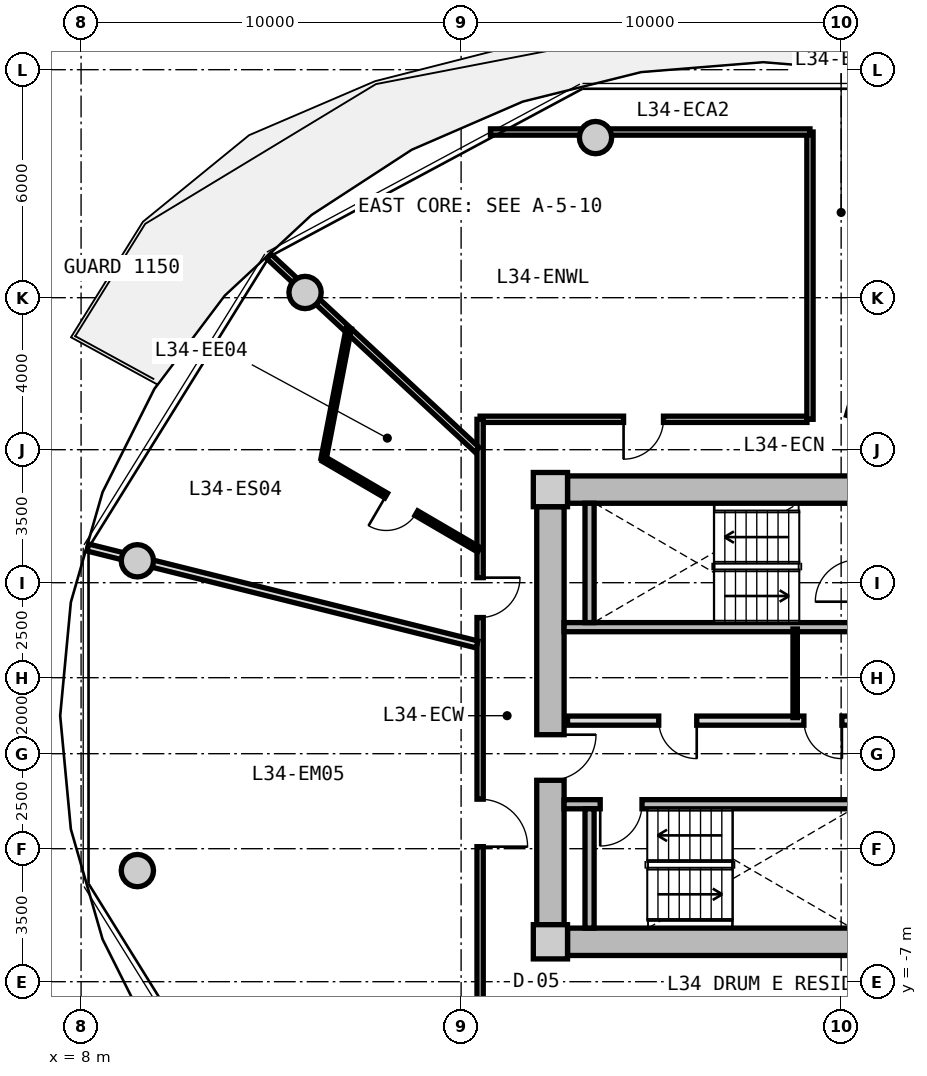
"""IFC4 building model, lengths in metres.
Left out: names, types, materials, properties, quantities, classifications, styles, units other than length and angle.
Written with IfcOpenShell. Run it as: python <this file> out.ifc"""

import sys

from ifc_helpers import new_model, si_unit, direction, frame, frame_2d, origin, origin_2d, place, context, subcontext, project, spatial, rectangle, circle, extrude, source, transform, mapped, element, fill, save


model = new_model("IFC4")
c1 = context("Model", 3, precision=1e-05, world=origin(), true_north=direction((0.0, 1.0)))
c2 = subcontext(c1, "Body", "Model", "MODEL_VIEW")
j1 = project(units=[si_unit("LENGTHUNIT", "METRE"), si_unit("PLANEANGLEUNIT", "RADIAN")], contexts=[c1])
p1 = place(None, origin())
s1 = spatial("IfcSite", under=j1, at=p1, CompositionType="ELEMENT")
p2 = place(p1, origin())
s2 = spatial("IfcBuilding", under=s1, at=p2, CompositionType="ELEMENT")
p3 = place(p2, frame((0.0, 0.0, 111.5)))
s3 = spatial("IfcBuildingStorey", under=s2, at=p3, CompositionType="ELEMENT", Elevation=111.5)
m1 = source(origin(), c2, "Body", "SweptSolid", [
    extrude(rectangle(XDim=0.9, YDim=0.9, at=origin_2d()), origin(), (0.0, 0.0, 1.0), 3.05),
])
for number, where, z_axis, x_axis in (
    (1, (20.35, -5.95, 0.0), (0.0, 0.0, 1.0), (1.0, 0.0, 0.0)),
    (2, (20.35, 5.95, 0.0), (0.0, 0.0, 1.0), (1.0, 0.0, 0.0)),
):
    element("IfcColumn", number, at=place(p3, frame(where, z_axis=z_axis, x_axis=x_axis)), inside=s3, PredefinedType="COLUMN", context=c2, shape_type="MappedRepresentation", body=[
        mapped(m1, transform((0.0, 0.0, 0.0), x_axis=(1.0, 0.0, 0.0), y_axis=(0.0, 1.0, 0.0), z_axis=(0.0, 0.0, 1.0), scale=1.0)),
    ])
m2 = source(origin(), c2, "Body", "SweptSolid", [
    extrude(rectangle(XDim=14.4, YDim=0.72, at=frame_2d((7.2, 0.0))), origin(), (0.0, 0.0, 1.0), 2.79),
])
for number, where, z_axis, x_axis in (
    (3, (20.8, 5.95, 0.0), (0.0, 0.0, 1.0), (1.0, 0.0, 0.0)),
    (4, (35.2, -5.95, 0.0), (0.0, 0.0, 1.0), (-1.0, 0.0, 0.0)),
):
    element("IfcWall", number, at=place(p3, frame(where, z_axis=z_axis, x_axis=x_axis)), inside=s3, PredefinedType="SHEAR", context=c2, shape_type="MappedRepresentation", body=[
        mapped(m2, transform((0.0, 0.0, 0.0), x_axis=(1.0, 0.0, 0.0), y_axis=(0.0, 1.0, 0.0), z_axis=(0.0, 0.0, 1.0), scale=1.0)),
    ])
m3 = source(origin(), c2, "Body", "SweptSolid", [
    extrude(rectangle(XDim=11.0, YDim=0.72, at=frame_2d((5.5, 0.0))), origin(), (0.0, 0.0, 1.0), 2.79),
])
p4 = place(p3, frame((20.35, -5.5, 0.0), z_axis=(0.0, 0.0, 1.0), x_axis=(0.0, 1.0, 0.0)))
e5 = element("IfcWall", 5, at=p4, inside=s3, PredefinedType="SHEAR", context=c2, shape_type="MappedRepresentation", body=[
    mapped(m3, transform((0.0, 0.0, 0.0), x_axis=(1.0, 0.0, 0.0), y_axis=(0.0, 1.0, 0.0), z_axis=(0.0, 0.0, 1.0), scale=1.0)),
])
p5 = place(p4, frame((3.8, 0.0, 0.0)))
e6 = element("IfcOpeningElement", 6, at=p5, cuts=e5, PredefinedType="OPENING", context=c2, shape_type="SweptSolid", body=[
    extrude(rectangle(XDim=1.2, YDim=2.15, at=frame_2d((0.6, 1.075))), frame((0.0, 0.37, 0.0), z_axis=(0.0, -1.0, 0.0), x_axis=(1.0, 0.0, 0.0)), (0.0, 0.0, 1.0), 0.74),
])
m4 = source(origin(), c2, "Body", "SweptSolid", [
    extrude(circle(Radius=0.425, at=origin_2d()), origin(), (0.0, 0.0, 1.0), 3.05),
])
for number, where, z_axis, x_axis in (
    (7, (21.537, 15.213, 0.0), (0.0, 0.0, 1.0), (1.0, 0.0, 0.0)),
    (8, (13.894, 11.137, 0.0), (0.0, 0.0, 1.0), (1.0, 0.0, 0.0)),
    (9, (9.481, 4.076, 0.0), (0.0, 0.0, 1.0), (1.0, 0.0, 0.0)),
    (10, (9.481, -4.076, 0.0), (0.0, 0.0, 1.0), (1.0, 0.0, 0.0)),
):
    element("IfcColumn", number, at=place(p3, frame(where, z_axis=z_axis, x_axis=x_axis)), inside=s3, PredefinedType="COLUMN", context=c2, shape_type="MappedRepresentation", body=[
        mapped(m4, transform((0.0, 0.0, 0.0), x_axis=(1.0, 0.0, 0.0), y_axis=(0.0, 1.0, 0.0), z_axis=(0.0, 0.0, 1.0), scale=1.0)),
    ])
m5 = source(origin(), c2, "Body", "SweptSolid", [
    extrude(rectangle(XDim=7.83, YDim=0.24, at=frame_2d((3.915, 0.0))), origin(), (0.0, 0.0, 1.0), 2.79),
])
p6 = place(p3, frame((20.71, 2.33, 0.0), z_axis=(0.0, 0.0, 1.0), x_axis=(1.0, 0.0, 0.0)))
e11 = element("IfcWall", 11, at=p6, inside=s3, PredefinedType="PARTITIONING", context=c2, shape_type="MappedRepresentation", body=[
    mapped(m5, transform((0.0, 0.0, 0.0), x_axis=(1.0, 0.0, 0.0), y_axis=(0.0, 1.0, 0.0), z_axis=(0.0, 0.0, 1.0), scale=1.0)),
])
m6 = source(origin(), c2, "Body", "SweptSolid", [
    extrude(rectangle(XDim=3.14, YDim=0.24, at=frame_2d((1.57, 0.0))), origin(), (0.0, 0.0, 1.0), 2.79),
])
p7 = place(p3, frame((21.38, 2.45, 0.0), z_axis=(0.0, 0.0, 1.0), x_axis=(0.0, 1.0, 0.0)))
e12 = element("IfcWall", 12, at=p7, inside=s3, PredefinedType="PARTITIONING", context=c2, shape_type="MappedRepresentation", body=[
    mapped(m6, transform((0.0, 0.0, 0.0), x_axis=(1.0, 0.0, 0.0), y_axis=(0.0, 1.0, 0.0), z_axis=(0.0, 0.0, 1.0), scale=1.0)),
])
p8 = place(p3, frame((20.71, -2.33, 0.0), z_axis=(0.0, 0.0, 1.0), x_axis=(1.0, 0.0, 0.0)))
e13 = element("IfcWall", 13, at=p8, inside=s3, PredefinedType="PARTITIONING", context=c2, shape_type="MappedRepresentation", body=[
    mapped(m5, transform((0.0, 0.0, 0.0), x_axis=(1.0, 0.0, 0.0), y_axis=(0.0, 1.0, 0.0), z_axis=(0.0, 0.0, 1.0), scale=1.0)),
])
p9 = place(p8, frame((0.95, 0.0, 0.0)))
e14 = element("IfcOpeningElement", 14, at=p9, cuts=e13, PredefinedType="OPENING", context=c2, shape_type="SweptSolid", body=[
    extrude(rectangle(XDim=1.1, YDim=2.15, at=frame_2d((0.55, 1.075))), frame((0.0, 0.13, 0.0), z_axis=(0.0, -1.0, 0.0), x_axis=(1.0, 0.0, 0.0)), (0.0, 0.0, 1.0), 0.26),
])
p10 = place(p3, frame((21.38, -5.59, 0.0), z_axis=(0.0, 0.0, 1.0), x_axis=(0.0, 1.0, 0.0)))
e15 = element("IfcWall", 15, at=p10, inside=s3, PredefinedType="PARTITIONING", context=c2, shape_type="MappedRepresentation", body=[
    mapped(m6, transform((0.0, 0.0, 0.0), x_axis=(1.0, 0.0, 0.0), y_axis=(0.0, 1.0, 0.0), z_axis=(0.0, 0.0, 1.0), scale=1.0)),
])
m7 = source(origin(), c2, "Body", "SweptSolid", [
    extrude(rectangle(XDim=7.62, YDim=0.24, at=frame_2d((3.81, 0.0))), origin(), (0.0, 0.0, 1.0), 2.775),
])
p11 = place(p3, frame((20.8, -0.13, 0.0), z_axis=(0.0, 0.0, 1.0), x_axis=(1.0, 0.0, 0.0)))
e16 = element("IfcWall", 16, at=p11, inside=s3, PredefinedType="PARTITIONING", context=c2, shape_type="MappedRepresentation", body=[
    mapped(m7, transform((0.0, 0.0, 0.0), x_axis=(1.0, 0.0, 0.0), y_axis=(0.0, 1.0, 0.0), z_axis=(0.0, 0.0, 1.0), scale=1.0)),
])
p12 = place(p11, frame((6.22, 0.0, 0.0)))
e17 = element("IfcOpeningElement", 17, at=p12, cuts=e16, PredefinedType="OPENING", context=c2, shape_type="SweptSolid", body=[
    extrude(rectangle(XDim=1.0, YDim=2.1, at=frame_2d((0.5, 1.05))), frame((0.0, 0.13, 0.0), z_axis=(0.0, -1.0, 0.0), x_axis=(1.0, 0.0, 0.0)), (0.0, 0.0, 1.0), 0.26),
])
p13 = place(p11, frame((2.4, 0.0, 0.0)))
e18 = element("IfcOpeningElement", 18, at=p13, cuts=e16, PredefinedType="OPENING", context=c2, shape_type="SweptSolid", body=[
    extrude(rectangle(XDim=1.0, YDim=2.1, at=frame_2d((0.5, 1.05))), frame((0.0, 0.13, 0.0), z_axis=(0.0, -1.0, 0.0), x_axis=(1.0, 0.0, 0.0)), (0.0, 0.0, 1.0), 0.26),
])
m8 = source(origin(), c2, "Body", "SweptSolid", [
    extrude(rectangle(XDim=2.33, YDim=0.115, at=frame_2d((1.165, 0.0))), origin(), (0.0, 0.0, 1.0), 2.775),
])
p14 = place(p3, frame((26.79, -0.05, 0.0), z_axis=(0.0, 0.0, 1.0), x_axis=(0.0, 1.0, 0.0)))
e19 = element("IfcWall", 19, at=p14, inside=s3, PredefinedType="PARTITIONING", context=c2, shape_type="MappedRepresentation", body=[
    mapped(m8, transform((0.0, 0.0, 0.0), x_axis=(1.0, 0.0, 0.0), y_axis=(0.0, 1.0, 0.0), z_axis=(0.0, 0.0, 1.0), scale=1.0)),
])
m9 = source(origin(), c2, "Body", "SweptSolid", [
    extrude(rectangle(XDim=8.6, YDim=0.165, at=frame_2d((4.3, 0.0))), origin(), (0.0, 0.0, 1.0), 2.775),
])
p15 = place(p3, frame((18.5, 7.8, 0.0), z_axis=(0.0, 0.0, 1.0), x_axis=(1.0, 0.0, 0.0)))
e20 = element("IfcWall", 20, at=p15, inside=s3, PredefinedType="PARTITIONING", context=c2, shape_type="MappedRepresentation", body=[
    mapped(m9, transform((0.0, 0.0, 0.0), x_axis=(1.0, 0.0, 0.0), y_axis=(0.0, 1.0, 0.0), z_axis=(0.0, 0.0, 1.0), scale=1.0)),
])
p16 = place(p15, frame((3.775, 0.0, 0.0)))
e21 = element("IfcOpeningElement", 21, at=p16, cuts=e20, PredefinedType="OPENING", context=c2, shape_type="SweptSolid", body=[
    extrude(rectangle(XDim=1.05, YDim=2.15, at=frame_2d((0.525, 1.075))), frame((0.0, 0.093, 0.0), z_axis=(0.0, -1.0, 0.0), x_axis=(1.0, 0.0, 0.0)), (0.0, 0.0, 1.0), 0.185),
])
m10 = source(origin(), c2, "Body", "SweptSolid", [
    extrude(rectangle(XDim=15.6, YDim=0.165, at=frame_2d((7.8, 0.0))), origin(), (0.0, 0.0, 1.0), 2.775),
])
p17 = place(p3, frame((18.5, -7.8, 0.0), z_axis=(0.0, 0.0, 1.0), x_axis=(0.0, 1.0, 0.0)))
e22 = element("IfcWall", 22, at=p17, inside=s3, PredefinedType="PARTITIONING", context=c2, shape_type="MappedRepresentation", body=[
    mapped(m10, transform((0.0, 0.0, 0.0), x_axis=(1.0, 0.0, 0.0), y_axis=(0.0, 1.0, 0.0), z_axis=(0.0, 0.0, 1.0), scale=1.0)),
])
p18 = place(p17, frame((10.383, 0.0, 0.0)))
e23 = element("IfcOpeningElement", 23, at=p18, cuts=e22, PredefinedType="OPENING", context=c2, shape_type="SweptSolid", body=[
    extrude(rectangle(XDim=1.05, YDim=2.15, at=frame_2d((0.525, 1.075))), frame((0.0, 0.093, 0.0), z_axis=(0.0, -1.0, 0.0), x_axis=(1.0, 0.0, 0.0)), (0.0, 0.0, 1.0), 0.185),
])
p19 = place(p17, frame((4.353, 0.0, 0.0)))
e24 = element("IfcOpeningElement", 24, at=p19, cuts=e22, PredefinedType="OPENING", context=c2, shape_type="SweptSolid", body=[
    extrude(rectangle(XDim=1.25, YDim=2.2, at=frame_2d((0.625, 1.1))), frame((0.0, 0.093, 0.0), z_axis=(0.0, -1.0, 0.0), x_axis=(1.0, 0.0, 0.0)), (0.0, 0.0, 1.0), 0.185),
])
m11 = source(origin(), c2, "Body", "SweptSolid", [
    extrude(rectangle(XDim=8.989, YDim=0.165, at=frame_2d((4.495, 0.0))), origin(), (0.0, 0.0, 1.0), 2.275),
])
p20 = place(p3, frame((28.222, 7.88, 0.0), z_axis=(0.0, 0.0, 1.0), x_axis=(0.27702323008, 0.960863221274, 0.0)))
e25 = element("IfcWall", 25, at=p20, inside=s3, PredefinedType="PARTITIONING", context=c2, shape_type="MappedRepresentation", body=[
    mapped(m11, transform((0.0, 0.0, 0.0), x_axis=(1.0, 0.0, 0.0), y_axis=(0.0, 1.0, 0.0), z_axis=(0.0, 0.0, 1.0), scale=1.0)),
])
m12 = source(origin(), c2, "Body", "SweptSolid", [
    extrude(rectangle(XDim=7.482, YDim=0.165, at=frame_2d((3.741, 0.0))), origin(), (0.0, 0.0, 1.0), 2.275),
])
p21 = place(p3, frame((18.42, 6.998, 0.0), z_axis=(0.0, 0.0, 1.0), x_axis=(-0.732508698043, 0.680757671489, 0.0)))
e26 = element("IfcWall", 26, at=p21, inside=s3, PredefinedType="PARTITIONING", context=c2, shape_type="MappedRepresentation", body=[
    mapped(m12, transform((0.0, 0.0, 0.0), x_axis=(1.0, 0.0, 0.0), y_axis=(0.0, 1.0, 0.0), z_axis=(0.0, 0.0, 1.0), scale=1.0)),
])
m13 = source(origin(), c2, "Body", "SweptSolid", [
    extrude(rectangle(XDim=7.56, YDim=0.165, at=frame_2d((3.78, 0.0))), origin(), (0.0, 0.0, 1.0), 2.775),
])
p22 = place(p3, frame((27.18, 7.8, 0.0), z_axis=(0.0, 0.0, 1.0), x_axis=(0.0, 1.0, 0.0)))
e27 = element("IfcWall", 27, at=p22, inside=s3, PredefinedType="PARTITIONING", context=c2, shape_type="MappedRepresentation", body=[
    mapped(m13, transform((0.0, 0.0, 0.0), x_axis=(1.0, 0.0, 0.0), y_axis=(0.0, 1.0, 0.0), z_axis=(0.0, 0.0, 1.0), scale=1.0)),
])
m14 = source(origin(), c2, "Body", "SweptSolid", [
    extrude(rectangle(XDim=8.407, YDim=0.165, at=frame_2d((4.204, 0.0))), origin(), (0.0, 0.0, 1.0), 2.275),
])
p23 = place(p3, frame((18.773, 15.36, 0.0), z_axis=(0.0, 0.0, 1.0), x_axis=(1.0, 0.0, 0.0)))
e28 = element("IfcWall", 28, at=p23, inside=s3, PredefinedType="PARTITIONING", context=c2, shape_type="MappedRepresentation", body=[
    mapped(m14, transform((0.0, 0.0, 0.0), x_axis=(1.0, 0.0, 0.0), y_axis=(0.0, 1.0, 0.0), z_axis=(0.0, 0.0, 1.0), scale=1.0)),
])
m15 = source(origin(), c2, "Body", "SweptSolid", [
    extrude(rectangle(XDim=10.556, YDim=0.19, at=frame_2d((5.278, 0.0))), origin(), (0.0, 0.0, 1.0), 2.275),
])
p24 = place(p3, frame((18.42, 1.875, 0.0), z_axis=(0.0, 0.0, 1.0), x_axis=(-0.970363857851, 0.241648470667, 0.0)))
e29 = element("IfcWall", 29, at=p24, inside=s3, PredefinedType="PARTITIONING", context=c2, shape_type="MappedRepresentation", body=[
    mapped(m15, transform((0.0, 0.0, 0.0), x_axis=(1.0, 0.0, 0.0), y_axis=(0.0, 1.0, 0.0), z_axis=(0.0, 0.0, 1.0), scale=1.0)),
])
m16 = source(origin(), c2, "Body", "SweptSolid", [
    extrude(rectangle(XDim=4.735, YDim=0.14, at=frame_2d((2.368, 0.0))), origin(), (0.0, 0.0, 1.0), 2.775),
])
p25 = place(p3, frame((18.47, 4.368, 0.0), z_axis=(0.0, 0.0, 1.0), x_axis=(-0.863537576642, 0.504284496814, 0.0)))
e30 = element("IfcWall", 30, at=p25, inside=s3, PredefinedType="PARTITIONING", context=c2, shape_type="MappedRepresentation", body=[
    mapped(m16, transform((0.0, 0.0, 0.0), x_axis=(1.0, 0.0, 0.0), y_axis=(0.0, 1.0, 0.0), z_axis=(0.0, 0.0, 1.0), scale=1.0)),
])
p26 = place(p25, frame((1.908, 0.0, 0.0)))
e31 = element("IfcOpeningElement", 31, at=p26, cuts=e30, PredefinedType="OPENING", context=c2, shape_type="SweptSolid", body=[
    extrude(rectangle(XDim=0.92, YDim=2.1, at=frame_2d((0.46, 1.05))), frame((0.0, 0.08, 0.0), z_axis=(0.0, -1.0, 0.0), x_axis=(1.0, 0.0, 0.0)), (0.0, 0.0, 1.0), 0.16),
])
m17 = source(origin(), c2, "Body", "SweptSolid", [
    extrude(rectangle(XDim=3.499, YDim=0.14, at=frame_2d((1.75, 0.0))), origin(), (0.0, 0.0, 1.0), 2.775),
])
p27 = place(p3, frame((14.381, 6.756, 0.0), z_axis=(0.0, 0.0, 1.0), x_axis=(0.18957713629, 0.981865830649, 0.0)))
e32 = element("IfcWall", 32, at=p27, inside=s3, PredefinedType="PARTITIONING", context=c2, shape_type="MappedRepresentation", body=[
    mapped(m17, transform((0.0, 0.0, 0.0), x_axis=(1.0, 0.0, 0.0), y_axis=(0.0, 1.0, 0.0), z_axis=(0.0, 0.0, 1.0), scale=1.0)),
])
m18 = source(origin(), c2, "Body", "SweptSolid", [
    extrude(rectangle(XDim=1.1, YDim=2.15, at=frame_2d((0.55, 1.075))), frame((0.0, 0.025, 0.0), z_axis=(0.0, -1.0, 0.0), x_axis=(1.0, 0.0, 0.0)), (0.0, 0.0, 1.0), 0.05),
])
p28 = place(p9, frame((1.1, 0.0, 0.0), z_axis=(0.0, 0.0, 1.0), x_axis=(-1.0, 0.0, 0.0)))
e33 = element("IfcDoor", 33, at=p28, inside=s3, OperationType="SINGLE_SWING_RIGHT", PredefinedType="DOOR", context=c2, shape_type="MappedRepresentation", body=[
    mapped(m18, transform((0.0, 0.0, 0.0), x_axis=(1.0, 0.0, 0.0), y_axis=(0.0, 1.0, 0.0), z_axis=(0.0, 0.0, 1.0), scale=1.0)),
])
fill(e14, e33)
m19 = source(origin(), c2, "Body", "SweptSolid", [
    extrude(rectangle(XDim=1.2, YDim=2.15, at=frame_2d((0.6, 1.075))), frame((0.0, 0.025, 0.0), z_axis=(0.0, -1.0, 0.0), x_axis=(1.0, 0.0, 0.0)), (0.0, 0.0, 1.0), 0.05),
])
p29 = place(p5, frame((1.2, 0.0, 0.0), z_axis=(0.0, 0.0, 1.0), x_axis=(-1.0, 0.0, 0.0)))
e34 = element("IfcDoor", 34, at=p29, inside=s3, OperationType="SINGLE_SWING_LEFT", PredefinedType="DOOR", context=c2, shape_type="MappedRepresentation", body=[
    mapped(m19, transform((0.0, 0.0, 0.0), x_axis=(1.0, 0.0, 0.0), y_axis=(0.0, 1.0, 0.0), z_axis=(0.0, 0.0, 1.0), scale=1.0)),
])
fill(e6, e34)
m20 = source(origin(), c2, "Body", "SweptSolid", [
    extrude(rectangle(XDim=1.0, YDim=2.1, at=frame_2d((0.5, 1.05))), frame((0.0, 0.025, 0.0), z_axis=(0.0, -1.0, 0.0), x_axis=(1.0, 0.0, 0.0)), (0.0, 0.0, 1.0), 0.05),
])
p30 = place(p12, frame((1.0, 0.0, 0.0), z_axis=(0.0, 0.0, 1.0), x_axis=(-1.0, 0.0, 0.0)))
e35 = element("IfcDoor", 35, at=p30, inside=s3, OperationType="SINGLE_SWING_LEFT", PredefinedType="DOOR", context=c2, shape_type="MappedRepresentation", body=[
    mapped(m20, transform((0.0, 0.0, 0.0), x_axis=(1.0, 0.0, 0.0), y_axis=(0.0, 1.0, 0.0), z_axis=(0.0, 0.0, 1.0), scale=1.0)),
])
fill(e17, e35)
p31 = place(p13, frame((1.0, 0.0, 0.0), z_axis=(0.0, 0.0, 1.0), x_axis=(-1.0, 0.0, 0.0)))
e36 = element("IfcDoor", 36, at=p31, inside=s3, OperationType="SINGLE_SWING_LEFT", PredefinedType="DOOR", context=c2, shape_type="MappedRepresentation", body=[
    mapped(m20, transform((0.0, 0.0, 0.0), x_axis=(1.0, 0.0, 0.0), y_axis=(0.0, 1.0, 0.0), z_axis=(0.0, 0.0, 1.0), scale=1.0)),
])
fill(e18, e36)
m21 = source(origin(), c2, "Body", "SweptSolid", [
    extrude(rectangle(XDim=1.05, YDim=2.15, at=frame_2d((0.525, 1.075))), frame((0.0, 0.025, 0.0), z_axis=(0.0, -1.0, 0.0), x_axis=(1.0, 0.0, 0.0)), (0.0, 0.0, 1.0), 0.05),
])
p32 = place(p16, frame((1.05, 0.0, 0.0), z_axis=(0.0, 0.0, 1.0), x_axis=(-1.0, 0.0, 0.0)))
e37 = element("IfcDoor", 37, at=p32, inside=s3, OperationType="SINGLE_SWING_RIGHT", PredefinedType="DOOR", context=c2, shape_type="MappedRepresentation", body=[
    mapped(m21, transform((0.0, 0.0, 0.0), x_axis=(1.0, 0.0, 0.0), y_axis=(0.0, 1.0, 0.0), z_axis=(0.0, 0.0, 1.0), scale=1.0)),
])
fill(e21, e37)
p33 = place(p18, frame((1.05, 0.0, 0.0), z_axis=(0.0, 0.0, 1.0), x_axis=(-1.0, 0.0, 0.0)))
e38 = element("IfcDoor", 38, at=p33, inside=s3, OperationType="SINGLE_SWING_LEFT", PredefinedType="DOOR", context=c2, shape_type="MappedRepresentation", body=[
    mapped(m21, transform((0.0, 0.0, 0.0), x_axis=(1.0, 0.0, 0.0), y_axis=(0.0, 1.0, 0.0), z_axis=(0.0, 0.0, 1.0), scale=1.0)),
])
fill(e23, e38)
m22 = source(origin(), c2, "Body", "SweptSolid", [
    extrude(rectangle(XDim=0.92, YDim=2.1, at=frame_2d((0.46, 1.05))), frame((0.0, 0.025, 0.0), z_axis=(0.0, -1.0, 0.0), x_axis=(1.0, 0.0, 0.0)), (0.0, 0.0, 1.0), 0.05),
])
p34 = place(p26, origin())
e39 = element("IfcDoor", 39, at=p34, inside=s3, OperationType="SINGLE_SWING_RIGHT", PredefinedType="DOOR", context=c2, shape_type="MappedRepresentation", body=[
    mapped(m22, transform((0.0, 0.0, 0.0), x_axis=(1.0, 0.0, 0.0), y_axis=(0.0, 1.0, 0.0), z_axis=(0.0, 0.0, 1.0), scale=1.0)),
])
fill(e31, e39)
m23 = source(origin(), c2, "Body", "SweptSolid", [
    extrude(rectangle(XDim=1.25, YDim=2.2, at=frame_2d((0.625, 1.1))), frame((0.0, 0.025, 0.0), z_axis=(0.0, -1.0, 0.0), x_axis=(1.0, 0.0, 0.0)), (0.0, 0.0, 1.0), 0.05),
])
p35 = place(p19, frame((1.25, 0.0, 0.0), z_axis=(0.0, 0.0, 1.0), x_axis=(-1.0, 0.0, 0.0)))
e40 = element("IfcDoor", 40, at=p35, inside=s3, OperationType="SINGLE_SWING_RIGHT", PredefinedType="DOOR", context=c2, shape_type="MappedRepresentation", body=[
    mapped(m23, transform((0.0, 0.0, 0.0), x_axis=(1.0, 0.0, 0.0), y_axis=(0.0, 1.0, 0.0), z_axis=(0.0, 0.0, 1.0), scale=1.0)),
])
fill(e24, e40)
save(model, sys.argv[1])
